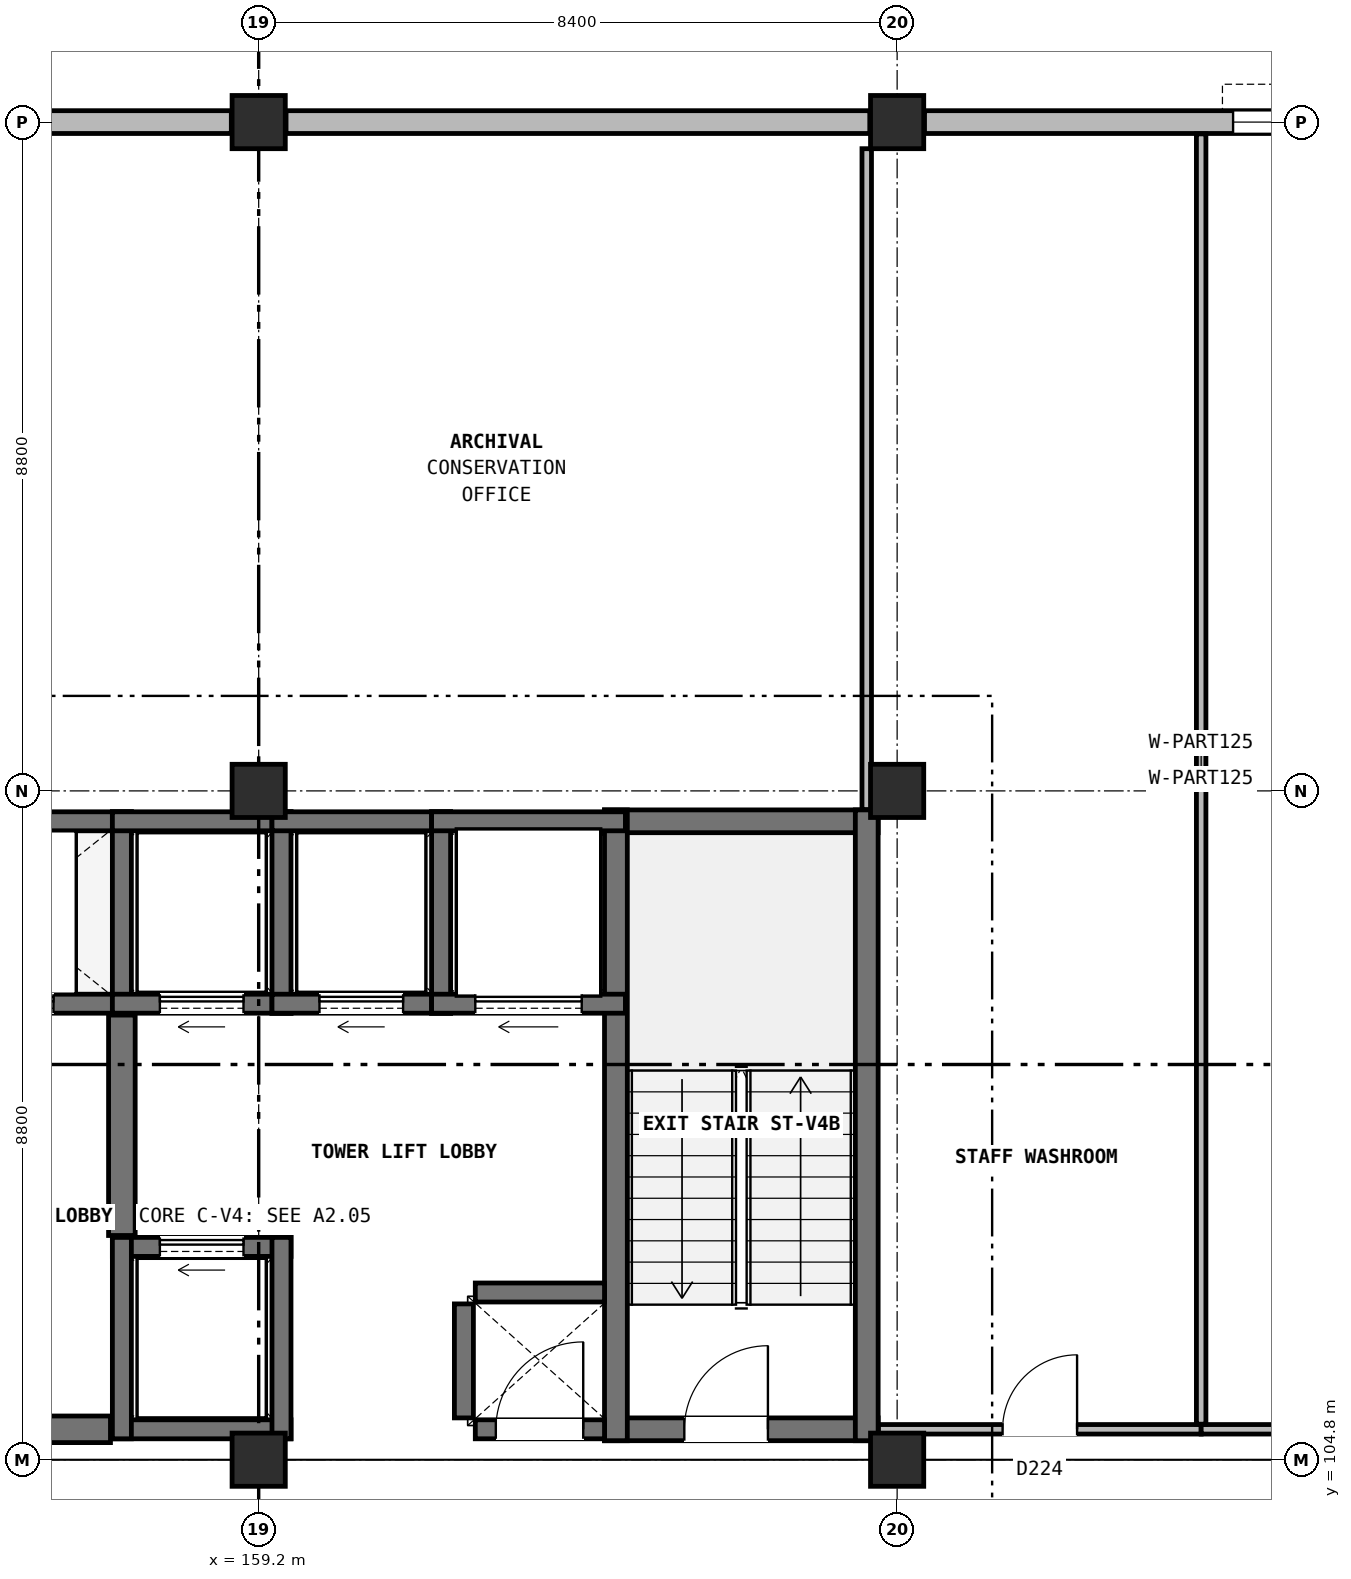
"""IFC4 building model, lengths in metres.
Left out: names, types, materials, properties, quantities, classifications, styles, units other than length and angle.
Written with IfcOpenShell. Run it as: python <this file> out.ifc"""

import sys

from ifc_helpers import new_model, si_unit, direction, frame, frame_2d, origin, origin_2d, place, context, subcontext, project, spatial, rectangle, extrude, element, fill, save


model = new_model("IFC4")
c1 = context("Model", 3, precision=1e-05, world=origin(), true_north=direction((0.0, 1.0)))
c2 = subcontext(c1, "Body", "Model", "MODEL_VIEW")
j1 = project(units=[si_unit("LENGTHUNIT", "METRE"), si_unit("PLANEANGLEUNIT", "RADIAN")], contexts=[c1])
p1 = place(None, origin())
s1 = spatial("IfcSite", under=j1, at=p1, CompositionType="ELEMENT")
p2 = place(p1, origin())
s2 = spatial("IfcBuilding", under=s1, at=p2, CompositionType="ELEMENT")
p3 = place(p2, frame((0.0, 0.0, 28.8)))
s3 = spatial("IfcBuildingStorey", under=s2, at=p3, CompositionType="ELEMENT", Elevation=28.8)
for number, where, z_axis, x_axis in (
    (1, (159.2, 104.8, 0.0), (0.0, 0.0, 1.0), (1.0, 0.0, 0.0)),
    (2, (159.2, 113.6, 0.0), (0.0, 0.0, 1.0), (1.0, 0.0, 0.0)),
    (3, (159.2, 122.4, 0.0), (0.0, 0.0, 1.0), (1.0, 0.0, 0.0)),
    (4, (167.6, 104.8, 0.0), (0.0, 0.0, 1.0), (1.0, 0.0, 0.0)),
    (5, (167.6, 113.6, 0.0), (0.0, 0.0, 1.0), (1.0, 0.0, 0.0)),
    (6, (167.6, 122.4, 0.0), (0.0, 0.0, 1.0), (1.0, 0.0, 0.0)),
):
    element("IfcColumn", number, at=place(p3, frame(where, z_axis=z_axis, x_axis=x_axis)), inside=s3, PredefinedType="COLUMN", context=c2, shape_type="SweptSolid", body=[
        extrude(rectangle(XDim=0.7, YDim=0.7, at=origin_2d()), origin(), (0.0, 0.0, 1.0), 4.0),
    ])
p4 = place(p3, frame((175.64, 122.4, 0.0), z_axis=(0.0, 0.0, 1.0), x_axis=(-1.0, 0.0, 0.0)))
e7 = element("IfcWall", 7, at=p4, inside=s3, PredefinedType="SOLIDWALL", context=c2, shape_type="SweptSolid", body=[
    extrude(rectangle(XDim=7.68, YDim=0.3, at=frame_2d((3.84, 0.0))), origin(), (0.0, 0.0, 1.0), 3.15),
])
p5 = place(p4, frame((0.42, 0.0, 0.9)))
e8 = element("IfcOpeningElement", 8, at=p5, cuts=e7, PredefinedType="OPENING", context=c2, shape_type="SweptSolid", body=[
    extrude(rectangle(XDim=3.2, YDim=2.1, at=frame_2d((1.6, 1.05))), frame((0.0, 0.16, 0.0), z_axis=(0.0, -1.0, 0.0), x_axis=(1.0, 0.0, 0.0)), (0.0, 0.0, 1.0), 0.32),
])
p6 = place(p3, frame((167.24, 122.4, 0.0), z_axis=(0.0, 0.0, 1.0), x_axis=(-1.0, 0.0, 0.0)))
e9 = element("IfcWall", 9, at=p6, inside=s3, PredefinedType="SOLIDWALL", context=c2, shape_type="SweptSolid", body=[
    extrude(rectangle(XDim=7.68, YDim=0.3, at=frame_2d((3.84, 0.0))), origin(), (0.0, 0.0, 1.0), 3.15),
])
p7 = place(p3, frame((158.84, 122.4, 0.0), z_axis=(0.0, 0.0, 1.0), x_axis=(-1.0, 0.0, 0.0)))
e10 = element("IfcWall", 10, at=p7, inside=s3, PredefinedType="SOLIDWALL", context=c2, shape_type="SweptSolid", body=[
    extrude(rectangle(XDim=7.68, YDim=0.3, at=frame_2d((3.84, 0.0))), origin(), (0.0, 0.0, 1.0), 3.15),
])
p8 = place(p3, frame((163.75, 105.2, 0.0), z_axis=(0.0, 0.0, 1.0), x_axis=(1.0, 0.0, 0.0)))
e11 = element("IfcWall", 11, at=p8, inside=s3, PredefinedType="SHEAR", context=c2, shape_type="SweptSolid", body=[
    extrude(rectangle(XDim=3.6, YDim=0.3, at=frame_2d((1.8, 0.0))), origin(), (0.0, 0.0, 1.0), 4.0),
])
p9 = place(p8, frame((1.05, 0.0, 0.0)))
e12 = element("IfcOpeningElement", 12, at=p9, cuts=e11, PredefinedType="OPENING", context=c2, shape_type="SweptSolid", body=[
    extrude(rectangle(XDim=1.1, YDim=2.2, at=frame_2d((0.55, 1.1))), frame((0.0, 0.16, 0.0), z_axis=(0.0, -1.0, 0.0), x_axis=(1.0, 0.0, 0.0)), (0.0, 0.0, 1.0), 0.32),
])
p10 = place(p3, frame((163.75, 113.2, 0.0), z_axis=(0.0, 0.0, 1.0), x_axis=(1.0, 0.0, 0.0)))
e13 = element("IfcWall", 13, at=p10, inside=s3, PredefinedType="SHEAR", context=c2, shape_type="SweptSolid", body=[
    extrude(rectangle(XDim=3.6, YDim=0.3, at=frame_2d((1.8, 0.0))), origin(), (0.0, 0.0, 1.0), 4.0),
])
for number, where, z_axis, x_axis in (
    (14, (163.9, 105.05, 0.0), (0.0, 0.0, 1.0), (0.0, 1.0, 0.0)),
    (15, (167.2, 105.05, 0.0), (0.0, 0.0, 1.0), (0.0, 1.0, 0.0)),
):
    element("IfcWall", number, at=place(p3, frame(where, z_axis=z_axis, x_axis=x_axis)), inside=s3, PredefinedType="SHEAR", context=c2, shape_type="SweptSolid", body=[
        extrude(rectangle(XDim=8.3, YDim=0.3, at=frame_2d((4.15, 0.0))), origin(), (0.0, 0.0, 1.0), 4.0),
    ])
p11 = place(p3, frame((154.275, 110.8, 0.0), z_axis=(0.0, 0.0, 1.0), x_axis=(1.0, 0.0, 0.0)))
e16 = element("IfcWall", 16, at=p11, inside=s3, PredefinedType="SOLIDWALL", context=c2, shape_type="SweptSolid", body=[
    extrude(rectangle(XDim=3.25, YDim=0.25, at=frame_2d((1.625, 0.0))), origin(), (0.0, 0.0, 1.0), 3.68),
])
p12 = place(p11, frame((1.025, 0.0, 0.0)))
e17 = element("IfcOpeningElement", 17, at=p12, cuts=e16, PredefinedType="OPENING", context=c2, shape_type="SweptSolid", body=[
    extrude(rectangle(XDim=1.2, YDim=2.2, at=frame_2d((0.6, 1.1))), frame((0.0, 0.135, 0.0), z_axis=(0.0, -1.0, 0.0), x_axis=(1.0, 0.0, 0.0)), (0.0, 0.0, 1.0), 0.27),
])
p13 = place(p3, frame((154.275, 113.2, 0.0), z_axis=(0.0, 0.0, 1.0), x_axis=(1.0, 0.0, 0.0)))
e18 = element("IfcWall", 18, at=p13, inside=s3, PredefinedType="SOLIDWALL", context=c2, shape_type="SweptSolid", body=[
    extrude(rectangle(XDim=3.25, YDim=0.25, at=frame_2d((1.625, 0.0))), origin(), (0.0, 0.0, 1.0), 3.68),
])
p14 = place(p3, frame((157.4, 110.675, 0.0), z_axis=(0.0, 0.0, 1.0), x_axis=(0.0, 1.0, 0.0)))
e19 = element("IfcWall", 19, at=p14, inside=s3, PredefinedType="SOLIDWALL", context=c2, shape_type="SweptSolid", body=[
    extrude(rectangle(XDim=2.65, YDim=0.25, at=frame_2d((1.325, 0.0))), origin(), (0.0, 0.0, 1.0), 3.68),
])
p15 = place(p3, frame((157.275, 110.8, 0.0), z_axis=(0.0, 0.0, 1.0), x_axis=(1.0, 0.0, 0.0)))
e20 = element("IfcWall", 20, at=p15, inside=s3, PredefinedType="SOLIDWALL", context=c2, shape_type="SweptSolid", body=[
    extrude(rectangle(XDim=2.35, YDim=0.25, at=frame_2d((1.175, 0.0))), origin(), (0.0, 0.0, 1.0), 3.68),
])
p16 = place(p15, frame((0.625, 0.0, 0.0)))
e21 = element("IfcOpeningElement", 21, at=p16, cuts=e20, PredefinedType="OPENING", context=c2, shape_type="SweptSolid", body=[
    extrude(rectangle(XDim=1.1, YDim=2.2, at=frame_2d((0.55, 1.1))), frame((0.0, 0.135, 0.0), z_axis=(0.0, -1.0, 0.0), x_axis=(1.0, 0.0, 0.0)), (0.0, 0.0, 1.0), 0.27),
])
p17 = place(p3, frame((157.275, 113.2, 0.0), z_axis=(0.0, 0.0, 1.0), x_axis=(1.0, 0.0, 0.0)))
e22 = element("IfcWall", 22, at=p17, inside=s3, PredefinedType="SOLIDWALL", context=c2, shape_type="SweptSolid", body=[
    extrude(rectangle(XDim=2.35, YDim=0.25, at=frame_2d((1.175, 0.0))), origin(), (0.0, 0.0, 1.0), 3.68),
])
p18 = place(p3, frame((159.5, 110.675, 0.0), z_axis=(0.0, 0.0, 1.0), x_axis=(0.0, 1.0, 0.0)))
e23 = element("IfcWall", 23, at=p18, inside=s3, PredefinedType="SOLIDWALL", context=c2, shape_type="SweptSolid", body=[
    extrude(rectangle(XDim=2.65, YDim=0.25, at=frame_2d((1.325, 0.0))), origin(), (0.0, 0.0, 1.0), 3.68),
])
p19 = place(p3, frame((159.375, 110.8, 0.0), z_axis=(0.0, 0.0, 1.0), x_axis=(1.0, 0.0, 0.0)))
e24 = element("IfcWall", 24, at=p19, inside=s3, PredefinedType="SOLIDWALL", context=c2, shape_type="SweptSolid", body=[
    extrude(rectangle(XDim=2.35, YDim=0.25, at=frame_2d((1.175, 0.0))), origin(), (0.0, 0.0, 1.0), 3.68),
])
p20 = place(p19, frame((0.625, 0.0, 0.0)))
e25 = element("IfcOpeningElement", 25, at=p20, cuts=e24, PredefinedType="OPENING", context=c2, shape_type="SweptSolid", body=[
    extrude(rectangle(XDim=1.1, YDim=2.2, at=frame_2d((0.55, 1.1))), frame((0.0, 0.135, 0.0), z_axis=(0.0, -1.0, 0.0), x_axis=(1.0, 0.0, 0.0)), (0.0, 0.0, 1.0), 0.27),
])
p21 = place(p3, frame((159.375, 113.2, 0.0), z_axis=(0.0, 0.0, 1.0), x_axis=(1.0, 0.0, 0.0)))
e26 = element("IfcWall", 26, at=p21, inside=s3, PredefinedType="SOLIDWALL", context=c2, shape_type="SweptSolid", body=[
    extrude(rectangle(XDim=2.35, YDim=0.25, at=frame_2d((1.175, 0.0))), origin(), (0.0, 0.0, 1.0), 3.68),
])
p22 = place(p3, frame((161.6, 110.675, 0.0), z_axis=(0.0, 0.0, 1.0), x_axis=(0.0, 1.0, 0.0)))
e27 = element("IfcWall", 27, at=p22, inside=s3, PredefinedType="SOLIDWALL", context=c2, shape_type="SweptSolid", body=[
    extrude(rectangle(XDim=2.65, YDim=0.25, at=frame_2d((1.325, 0.0))), origin(), (0.0, 0.0, 1.0), 3.68),
])
p23 = place(p3, frame((157.275, 105.2, 0.0), z_axis=(0.0, 0.0, 1.0), x_axis=(1.0, 0.0, 0.0)))
e28 = element("IfcWall", 28, at=p23, inside=s3, PredefinedType="SOLIDWALL", context=c2, shape_type="SweptSolid", body=[
    extrude(rectangle(XDim=2.35, YDim=0.25, at=frame_2d((1.175, 0.0))), origin(), (0.0, 0.0, 1.0), 3.68),
])
p24 = place(p3, frame((157.275, 107.6, 0.0), z_axis=(0.0, 0.0, 1.0), x_axis=(1.0, 0.0, 0.0)))
e29 = element("IfcWall", 29, at=p24, inside=s3, PredefinedType="SOLIDWALL", context=c2, shape_type="SweptSolid", body=[
    extrude(rectangle(XDim=2.35, YDim=0.25, at=frame_2d((1.175, 0.0))), origin(), (0.0, 0.0, 1.0), 3.68),
])
p25 = place(p24, frame((0.625, 0.0, 0.0)))
e30 = element("IfcOpeningElement", 30, at=p25, cuts=e29, PredefinedType="OPENING", context=c2, shape_type="SweptSolid", body=[
    extrude(rectangle(XDim=1.1, YDim=2.2, at=frame_2d((0.55, 1.1))), frame((0.0, 0.135, 0.0), z_axis=(0.0, -1.0, 0.0), x_axis=(1.0, 0.0, 0.0)), (0.0, 0.0, 1.0), 0.27),
])
for number, where, z_axis, x_axis in (
    (31, (157.4, 105.075, 0.0), (0.0, 0.0, 1.0), (0.0, 1.0, 0.0)),
    (32, (159.5, 105.075, 0.0), (0.0, 0.0, 1.0), (0.0, 1.0, 0.0)),
):
    element("IfcWall", number, at=place(p3, frame(where, z_axis=z_axis, x_axis=x_axis)), inside=s3, PredefinedType="SOLIDWALL", context=c2, shape_type="SweptSolid", body=[
        extrude(rectangle(XDim=2.65, YDim=0.25, at=frame_2d((1.325, 0.0))), origin(), (0.0, 0.0, 1.0), 3.68),
    ])
p26 = place(p3, frame((161.475, 110.8, 0.0), z_axis=(0.0, 0.0, 1.0), x_axis=(1.0, 0.0, 0.0)))
e33 = element("IfcWall", 33, at=p26, inside=s3, PredefinedType="SOLIDWALL", context=c2, shape_type="SweptSolid", body=[
    extrude(rectangle(XDim=2.55, YDim=0.25, at=frame_2d((1.275, 0.0))), origin(), (0.0, 0.0, 1.0), 3.68),
])
p27 = place(p26, frame((0.575, 0.0, 0.0)))
e34 = element("IfcOpeningElement", 34, at=p27, cuts=e33, PredefinedType="OPENING", context=c2, shape_type="SweptSolid", body=[
    extrude(rectangle(XDim=1.4, YDim=2.3, at=frame_2d((0.7, 1.15))), frame((0.0, 0.135, 0.0), z_axis=(0.0, -1.0, 0.0), x_axis=(1.0, 0.0, 0.0)), (0.0, 0.0, 1.0), 0.27),
])
p28 = place(p3, frame((161.475, 113.2, 0.0), z_axis=(0.0, 0.0, 1.0), x_axis=(1.0, 0.0, 0.0)))
e35 = element("IfcWall", 35, at=p28, inside=s3, PredefinedType="SOLIDWALL", context=c2, shape_type="SweptSolid", body=[
    extrude(rectangle(XDim=2.55, YDim=0.25, at=frame_2d((1.275, 0.0))), origin(), (0.0, 0.0, 1.0), 3.68),
])
p29 = place(p3, frame((157.4, 107.75, 0.0), z_axis=(0.0, 0.0, 1.0), x_axis=(0.0, 1.0, 0.0)))
e36 = element("IfcWall", 36, at=p29, inside=s3, PredefinedType="SHEAR", context=c2, shape_type="SweptSolid", body=[
    extrude(rectangle(XDim=2.9, YDim=0.35, at=frame_2d((1.45, 0.0))), origin(), (0.0, 0.0, 1.0), 3.68),
])
p30 = place(p3, frame((154.55, 105.2, 0.0), z_axis=(0.0, 0.0, 1.0), x_axis=(1.0, 0.0, 0.0)))
e37 = element("IfcWall", 37, at=p30, inside=s3, PredefinedType="SHEAR", context=c2, shape_type="SweptSolid", body=[
    extrude(rectangle(XDim=2.7, YDim=0.35, at=frame_2d((1.35, 0.0))), origin(), (0.0, 0.0, 1.0), 3.68),
])
p31 = place(p30, frame((0.8, 0.0, 0.0)))
e38 = element("IfcOpeningElement", 38, at=p31, cuts=e37, PredefinedType="OPENING", context=c2, shape_type="SweptSolid", body=[
    extrude(rectangle(XDim=1.1, YDim=2.2, at=frame_2d((0.55, 1.1))), frame((0.0, 0.185, 0.0), z_axis=(0.0, -1.0, 0.0), x_axis=(1.0, 0.0, 0.0)), (0.0, 0.0, 1.0), 0.37),
])
p32 = place(p3, frame((161.9, 105.35, 0.0), z_axis=(0.0, 0.0, 1.0), x_axis=(0.0, 1.0, 0.0)))
e39 = element("IfcWall", 39, at=p32, inside=s3, PredefinedType="SOLIDWALL", context=c2, shape_type="SweptSolid", body=[
    extrude(rectangle(XDim=1.5, YDim=0.25, at=frame_2d((0.75, 0.0))), origin(), (0.0, 0.0, 1.0), 3.68),
])
p33 = place(p3, frame((162.05, 107.0, 0.0), z_axis=(0.0, 0.0, 1.0), x_axis=(1.0, 0.0, 0.0)))
e40 = element("IfcWall", 40, at=p33, inside=s3, PredefinedType="SOLIDWALL", context=c2, shape_type="SweptSolid", body=[
    extrude(rectangle(XDim=1.7, YDim=0.25, at=frame_2d((0.85, 0.0))), origin(), (0.0, 0.0, 1.0), 3.68),
])
p34 = place(p3, frame((162.05, 105.2, 0.0), z_axis=(0.0, 0.0, 1.0), x_axis=(1.0, 0.0, 0.0)))
e41 = element("IfcWall", 41, at=p34, inside=s3, PredefinedType="SOLIDWALL", context=c2, shape_type="SweptSolid", body=[
    extrude(rectangle(XDim=1.7, YDim=0.25, at=frame_2d((0.85, 0.0))), origin(), (0.0, 0.0, 1.0), 3.68),
])
p35 = place(p34, frame((0.27, 0.0, 0.0)))
e42 = element("IfcOpeningElement", 42, at=p35, cuts=e41, PredefinedType="OPENING", context=c2, shape_type="SweptSolid", body=[
    extrude(rectangle(XDim=1.15, YDim=2.2, at=frame_2d((0.575, 1.1))), frame((0.0, 0.135, 0.0), z_axis=(0.0, -1.0, 0.0), x_axis=(1.0, 0.0, 0.0)), (0.0, 0.0, 1.0), 0.27),
])
p36 = place(p3, frame((167.355, 105.2, 0.0), z_axis=(0.0, 0.0, 1.0), x_axis=(1.0, 0.0, 0.0)))
e43 = element("IfcWall", 43, at=p36, inside=s3, PredefinedType="PARTITIONING", context=c2, shape_type="SweptSolid", body=[
    extrude(rectangle(XDim=4.245, YDim=0.125, at=frame_2d((2.123, 0.0))), origin(), (0.0, 0.0, 1.0), 3.145),
])
p37 = place(p36, frame((1.633, 0.0, 0.0)))
e44 = element("IfcOpeningElement", 44, at=p37, cuts=e43, PredefinedType="OPENING", context=c2, shape_type="SweptSolid", body=[
    extrude(rectangle(XDim=0.98, YDim=2.1, at=frame_2d((0.49, 1.05))), frame((0.0, 0.073, 0.0), z_axis=(0.0, -1.0, 0.0), x_axis=(1.0, 0.0, 0.0)), (0.0, 0.0, 1.0), 0.145),
])
p38 = place(p3, frame((171.6, 105.2, 0.0), z_axis=(0.0, 0.0, 1.0), x_axis=(1.0, 0.0, 0.0)))
e45 = element("IfcWall", 45, at=p38, inside=s3, PredefinedType="PARTITIONING", context=c2, shape_type="SweptSolid", body=[
    extrude(rectangle(XDim=4.05, YDim=0.125, at=frame_2d((2.025, 0.0))), origin(), (0.0, 0.0, 1.0), 3.145),
])
p39 = place(p38, frame((1.535, 0.0, 0.0)))
e46 = element("IfcOpeningElement", 46, at=p39, cuts=e45, PredefinedType="OPENING", context=c2, shape_type="SweptSolid", body=[
    extrude(rectangle(XDim=0.98, YDim=2.1, at=frame_2d((0.49, 1.05))), frame((0.0, 0.073, 0.0), z_axis=(0.0, -1.0, 0.0), x_axis=(1.0, 0.0, 0.0)), (0.0, 0.0, 1.0), 0.145),
])
p40 = place(p3, frame((167.2, 113.355, 0.0), z_axis=(0.0, 0.0, 1.0), x_axis=(0.0, 1.0, 0.0)))
e47 = element("IfcWall", 47, at=p40, inside=s3, PredefinedType="PARTITIONING", context=c2, shape_type="SweptSolid", body=[
    extrude(rectangle(XDim=8.695, YDim=0.125, at=frame_2d((4.348, 0.0))), origin(), (0.0, 0.0, 1.0), 3.145),
])
p41 = place(p3, frame((171.6, 105.268, 0.0), z_axis=(0.0, 0.0, 1.0), x_axis=(0.0, 1.0, 0.0)))
e48 = element("IfcWall", 48, at=p41, inside=s3, PredefinedType="PARTITIONING", context=c2, shape_type="SweptSolid", body=[
    extrude(rectangle(XDim=16.978, YDim=0.125, at=frame_2d((8.489, 0.0))), origin(), (0.0, 0.0, 1.0), 3.665),
])
p42 = place(p5, origin())
e49 = element("IfcWindow", 49, at=p42, inside=s3, PartitioningType="SINGLE_PANEL", PredefinedType="WINDOW", context=c2, shape_type="SweptSolid", body=[
    extrude(rectangle(XDim=3.2, YDim=2.1, at=frame_2d((1.6, 1.05))), frame((0.0, 0.03, 0.0), z_axis=(0.0, -1.0, 0.0), x_axis=(1.0, 0.0, 0.0)), (0.0, 0.0, 1.0), 0.06),
])
fill(e8, e49)
p43 = place(p9, origin())
e50 = element("IfcDoor", 50, at=p43, inside=s3, OperationType="SINGLE_SWING_RIGHT", PredefinedType="DOOR", context=c2, shape_type="SweptSolid", body=[
    extrude(rectangle(XDim=1.1, YDim=2.2, at=frame_2d((0.55, 1.1))), frame((0.0, 0.025, 0.0), z_axis=(0.0, -1.0, 0.0), x_axis=(1.0, 0.0, 0.0)), (0.0, 0.0, 1.0), 0.05),
])
fill(e12, e50)
p44 = place(p12, origin())
e51 = element("IfcDoor", 51, at=p44, inside=s3, OperationType="SLIDING_TO_LEFT", PredefinedType="DOOR", context=c2, shape_type="SweptSolid", body=[
    extrude(rectangle(XDim=1.2, YDim=2.2, at=frame_2d((0.6, 1.1))), frame((0.0, 0.025, 0.0), z_axis=(0.0, -1.0, 0.0), x_axis=(1.0, 0.0, 0.0)), (0.0, 0.0, 1.0), 0.05),
])
fill(e17, e51)
p45 = place(p16, origin())
e52 = element("IfcDoor", 52, at=p45, inside=s3, OperationType="SLIDING_TO_LEFT", PredefinedType="DOOR", context=c2, shape_type="SweptSolid", body=[
    extrude(rectangle(XDim=1.1, YDim=2.2, at=frame_2d((0.55, 1.1))), frame((0.0, 0.025, 0.0), z_axis=(0.0, -1.0, 0.0), x_axis=(1.0, 0.0, 0.0)), (0.0, 0.0, 1.0), 0.05),
])
fill(e21, e52)
p46 = place(p20, origin())
e53 = element("IfcDoor", 53, at=p46, inside=s3, OperationType="SLIDING_TO_LEFT", PredefinedType="DOOR", context=c2, shape_type="SweptSolid", body=[
    extrude(rectangle(XDim=1.1, YDim=2.2, at=frame_2d((0.55, 1.1))), frame((0.0, 0.025, 0.0), z_axis=(0.0, -1.0, 0.0), x_axis=(1.0, 0.0, 0.0)), (0.0, 0.0, 1.0), 0.05),
])
fill(e25, e53)
p47 = place(p25, origin())
e54 = element("IfcDoor", 54, at=p47, inside=s3, OperationType="SLIDING_TO_LEFT", PredefinedType="DOOR", context=c2, shape_type="SweptSolid", body=[
    extrude(rectangle(XDim=1.1, YDim=2.2, at=frame_2d((0.55, 1.1))), frame((0.0, 0.025, 0.0), z_axis=(0.0, -1.0, 0.0), x_axis=(1.0, 0.0, 0.0)), (0.0, 0.0, 1.0), 0.05),
])
fill(e30, e54)
p48 = place(p27, origin())
e55 = element("IfcDoor", 55, at=p48, inside=s3, OperationType="SLIDING_TO_LEFT", PredefinedType="DOOR", context=c2, shape_type="SweptSolid", body=[
    extrude(rectangle(XDim=1.4, YDim=2.3, at=frame_2d((0.7, 1.15))), frame((0.0, 0.025, 0.0), z_axis=(0.0, -1.0, 0.0), x_axis=(1.0, 0.0, 0.0)), (0.0, 0.0, 1.0), 0.05),
])
fill(e34, e55)
p49 = place(p35, origin())
e56 = element("IfcDoor", 56, at=p49, inside=s3, OperationType="SINGLE_SWING_RIGHT", PredefinedType="DOOR", context=c2, shape_type="SweptSolid", body=[
    extrude(rectangle(XDim=1.15, YDim=2.2, at=frame_2d((0.575, 1.1))), frame((0.0, 0.025, 0.0), z_axis=(0.0, -1.0, 0.0), x_axis=(1.0, 0.0, 0.0)), (0.0, 0.0, 1.0), 0.05),
])
fill(e42, e56)
p50 = place(p37, origin())
e57 = element("IfcDoor", 57, at=p50, inside=s3, OperationType="SINGLE_SWING_RIGHT", PredefinedType="DOOR", context=c2, shape_type="SweptSolid", body=[
    extrude(rectangle(XDim=0.98, YDim=2.1, at=frame_2d((0.49, 1.05))), frame((0.0, 0.025, 0.0), z_axis=(0.0, -1.0, 0.0), x_axis=(1.0, 0.0, 0.0)), (0.0, 0.0, 1.0), 0.05),
])
fill(e44, e57)
save(model, sys.argv[1])
